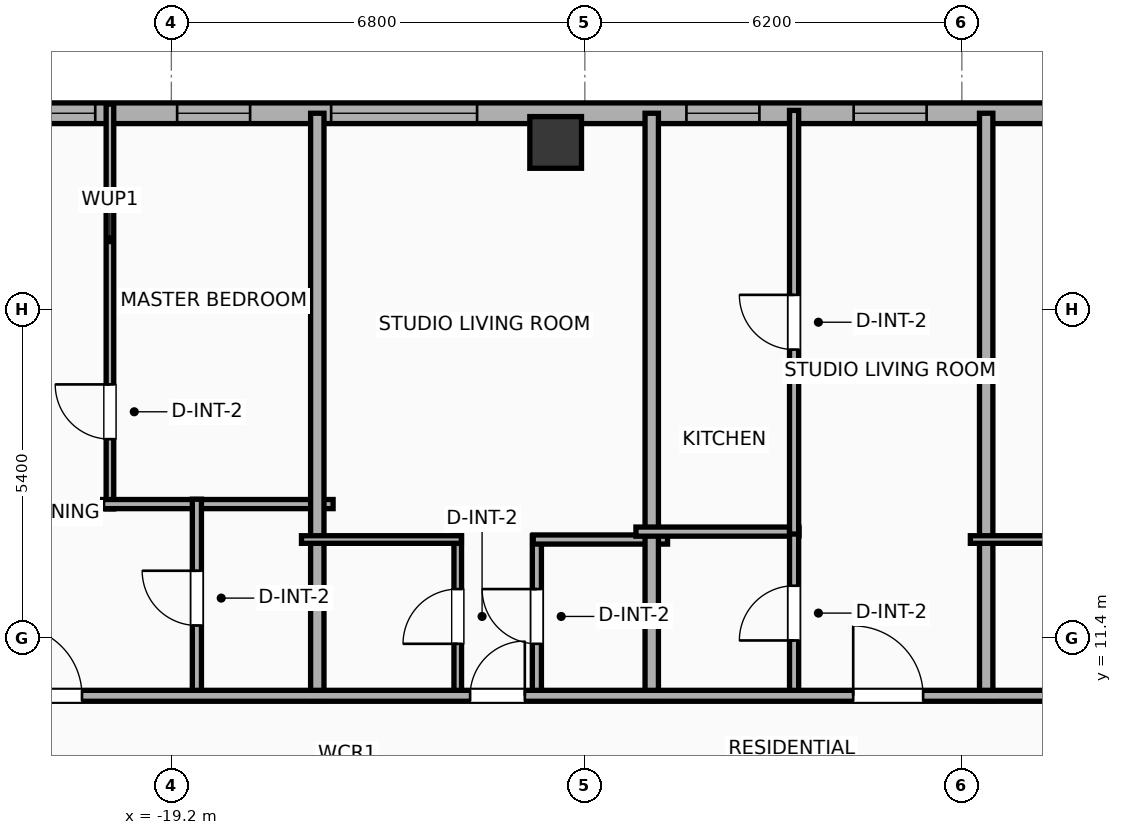
"""IFC4 building model, lengths in metres.
Left out: names, types, materials, properties, quantities, classifications, styles, units other than length and angle.
Written with IfcOpenShell. Run it as: python <this file> out.ifc"""

import sys

from ifc_helpers import new_model, si_unit, direction, frame, frame_2d, origin, origin_2d, place, context, subcontext, project, spatial, rectangle, hollow_rectangle, extrude, element, fill, save


model = new_model("IFC4")
c1 = context("Model", 3, precision=1e-05, world=origin(), true_north=direction((0.0, 1.0)))
c2 = subcontext(c1, "Body", "Model", "MODEL_VIEW")
j1 = project(units=[si_unit("LENGTHUNIT", "METRE"), si_unit("PLANEANGLEUNIT", "RADIAN")], contexts=[c1])
p1 = place(None, origin())
s1 = spatial("IfcSite", under=j1, at=p1, CompositionType="ELEMENT")
p2 = place(p1, origin())
s2 = spatial("IfcBuilding", under=s1, at=p2, CompositionType="ELEMENT")
p3 = place(p2, frame((0.0, 0.0, 239.2)))
s3 = spatial("IfcBuildingStorey", under=s2, at=p3, CompositionType="ELEMENT", Elevation=239.2)
p4 = place(p3, frame((-12.88, 19.55, 0.0), z_axis=(0.0, 0.0, 1.0), x_axis=(1.0, 0.0, 0.0)))
e1 = element("IfcColumn", 1, at=p4, inside=s3, PredefinedType="COLUMN", context=c2, shape_type="SweptSolid", body=[
    extrude(hollow_rectangle(XDim=0.85, YDim=0.85, WallThickness=0.028, at=origin_2d()), origin(), (0.0, 0.0, 1.0), 3.9),
])
p5 = place(p3, frame((-22.783, 20.03, 0.0), z_axis=(0.0, 0.0, 1.0), x_axis=(1.0, 0.0, 0.0)))
e2 = element("IfcWall", 2, at=p5, inside=s3, PredefinedType="ELEMENTEDWALL", context=c2, shape_type="SweptSolid", body=[
    extrude(rectangle(XDim=49.566, YDim=0.34, at=frame_2d((24.783, 0.0))), origin(), (0.0, 0.0, 1.0), 3.65),
])
p6 = place(p5, frame((6.211, 0.0, 0.75)))
e3 = element("IfcOpeningElement", 3, at=p6, cuts=e2, PredefinedType="OPENING", context=c2, shape_type="SweptSolid", body=[
    extrude(rectangle(XDim=2.4, YDim=2.1, at=frame_2d((1.2, 1.05))), frame((0.0, 0.18, 0.0), z_axis=(0.0, -1.0, 0.0), x_axis=(1.0, 0.0, 0.0)), (0.0, 0.0, 1.0), 0.36),
])
p7 = place(p5, frame((22.733, 0.0, 0.75)))
e4 = element("IfcOpeningElement", 4, at=p7, cuts=e2, PredefinedType="OPENING", context=c2, shape_type="SweptSolid", body=[
    extrude(rectangle(XDim=2.4, YDim=2.1, at=frame_2d((1.2, 1.05))), frame((0.0, 0.18, 0.0), z_axis=(0.0, -1.0, 0.0), x_axis=(1.0, 0.0, 0.0)), (0.0, 0.0, 1.0), 0.36),
])
p8 = place(p5, frame((1.132, 0.0, 0.75)))
e5 = element("IfcOpeningElement", 5, at=p8, cuts=e2, PredefinedType="OPENING", context=c2, shape_type="SweptSolid", body=[
    extrude(rectangle(XDim=1.2, YDim=2.05, at=frame_2d((0.6, 1.025))), frame((0.0, 0.18, 0.0), z_axis=(0.0, -1.0, 0.0), x_axis=(1.0, 0.0, 0.0)), (0.0, 0.0, 1.0), 0.36),
])
p9 = place(p5, frame((3.678, 0.0, 0.75)))
e6 = element("IfcOpeningElement", 6, at=p9, cuts=e2, PredefinedType="OPENING", context=c2, shape_type="SweptSolid", body=[
    extrude(rectangle(XDim=1.2, YDim=2.05, at=frame_2d((0.6, 1.025))), frame((0.0, 0.18, 0.0), z_axis=(0.0, -1.0, 0.0), x_axis=(1.0, 0.0, 0.0)), (0.0, 0.0, 1.0), 0.36),
])
p10 = place(p5, frame((14.804, 0.0, 0.75)))
e7 = element("IfcOpeningElement", 7, at=p10, cuts=e2, PredefinedType="OPENING", context=c2, shape_type="SweptSolid", body=[
    extrude(rectangle(XDim=1.2, YDim=2.05, at=frame_2d((0.6, 1.025))), frame((0.0, 0.18, 0.0), z_axis=(0.0, -1.0, 0.0), x_axis=(1.0, 0.0, 0.0)), (0.0, 0.0, 1.0), 0.36),
])
p11 = place(p5, frame((12.054, 0.0, 0.75)))
e8 = element("IfcOpeningElement", 8, at=p11, cuts=e2, PredefinedType="OPENING", context=c2, shape_type="SweptSolid", body=[
    extrude(rectangle(XDim=1.2, YDim=2.05, at=frame_2d((0.6, 1.025))), frame((0.0, 0.18, 0.0), z_axis=(0.0, -1.0, 0.0), x_axis=(1.0, 0.0, 0.0)), (0.0, 0.0, 1.0), 0.36),
])
p12 = place(p5, frame((17.933, 0.0, 0.75)))
e9 = element("IfcOpeningElement", 9, at=p12, cuts=e2, PredefinedType="OPENING", context=c2, shape_type="SweptSolid", body=[
    extrude(rectangle(XDim=1.2, YDim=2.05, at=frame_2d((0.6, 1.025))), frame((0.0, 0.18, 0.0), z_axis=(0.0, -1.0, 0.0), x_axis=(1.0, 0.0, 0.0)), (0.0, 0.0, 1.0), 0.36),
])
p13 = place(p5, frame((26.278, 0.0, 0.75)))
e10 = element("IfcOpeningElement", 10, at=p13, cuts=e2, PredefinedType="OPENING", context=c2, shape_type="SweptSolid", body=[
    extrude(rectangle(XDim=1.2, YDim=2.05, at=frame_2d((0.6, 1.025))), frame((0.0, 0.18, 0.0), z_axis=(0.0, -1.0, 0.0), x_axis=(1.0, 0.0, 0.0)), (0.0, 0.0, 1.0), 0.36),
])
p14 = place(p5, frame((32.677, 0.0, 0.75)))
e11 = element("IfcOpeningElement", 11, at=p14, cuts=e2, PredefinedType="OPENING", context=c2, shape_type="SweptSolid", body=[
    extrude(rectangle(XDim=1.2, YDim=2.05, at=frame_2d((0.6, 1.025))), frame((0.0, 0.18, 0.0), z_axis=(0.0, -1.0, 0.0), x_axis=(1.0, 0.0, 0.0)), (0.0, 0.0, 1.0), 0.36),
])
p15 = place(p5, frame((28.217, 0.0, 0.75)))
e12 = element("IfcOpeningElement", 12, at=p15, cuts=e2, PredefinedType="OPENING", context=c2, shape_type="SweptSolid", body=[
    extrude(rectangle(XDim=0.85, YDim=2.05, at=frame_2d((0.425, 1.025))), frame((0.0, 0.18, 0.0), z_axis=(0.0, -1.0, 0.0), x_axis=(1.0, 0.0, 0.0)), (0.0, 0.0, 1.0), 0.36),
])
p16 = place(p5, frame((36.678, 0.0, 0.75)))
e13 = element("IfcOpeningElement", 13, at=p16, cuts=e2, PredefinedType="OPENING", context=c2, shape_type="SweptSolid", body=[
    extrude(rectangle(XDim=1.2, YDim=2.05, at=frame_2d((0.6, 1.025))), frame((0.0, 0.18, 0.0), z_axis=(0.0, -1.0, 0.0), x_axis=(1.0, 0.0, 0.0)), (0.0, 0.0, 1.0), 0.36),
])
p17 = place(p5, frame((40.307, 0.0, 0.75)))
e14 = element("IfcOpeningElement", 14, at=p17, cuts=e2, PredefinedType="OPENING", context=c2, shape_type="SweptSolid", body=[
    extrude(rectangle(XDim=1.2, YDim=2.05, at=frame_2d((0.6, 1.025))), frame((0.0, 0.18, 0.0), z_axis=(0.0, -1.0, 0.0), x_axis=(1.0, 0.0, 0.0)), (0.0, 0.0, 1.0), 0.36),
])
p18 = place(p5, frame((43.696, 0.0, 0.75)))
e15 = element("IfcOpeningElement", 15, at=p18, cuts=e2, PredefinedType="OPENING", context=c2, shape_type="SweptSolid", body=[
    extrude(rectangle(XDim=1.2, YDim=2.05, at=frame_2d((0.6, 1.025))), frame((0.0, 0.18, 0.0), z_axis=(0.0, -1.0, 0.0), x_axis=(1.0, 0.0, 0.0)), (0.0, 0.0, 1.0), 0.36),
])
p19 = place(p5, frame((46.739, 0.0, 0.75)))
e16 = element("IfcOpeningElement", 16, at=p19, cuts=e2, PredefinedType="OPENING", context=c2, shape_type="SweptSolid", body=[
    extrude(rectangle(XDim=1.2, YDim=2.05, at=frame_2d((0.6, 1.025))), frame((0.0, 0.18, 0.0), z_axis=(0.0, -1.0, 0.0), x_axis=(1.0, 0.0, 0.0)), (0.0, 0.0, 1.0), 0.36),
])
p20 = place(p3, frame((-20.21, 13.523, 0.0), z_axis=(0.0, 0.0, 1.0), x_axis=(0.0, 1.0, 0.0)))
e17 = element("IfcWall", 17, at=p20, inside=s3, PredefinedType="PARTITIONING", context=c2, shape_type="SweptSolid", body=[
    extrude(rectangle(XDim=6.657, YDim=0.125, at=frame_2d((3.329, 0.0))), origin(), (0.0, 0.0, 1.0), 3.65),
])
p21 = place(p20, frame((1.148, 0.0, 0.0)))
e18 = element("IfcOpeningElement", 18, at=p21, cuts=e17, PredefinedType="OPENING", context=c2, shape_type="SweptSolid", body=[
    extrude(rectangle(XDim=0.9, YDim=2.05, at=frame_2d((0.45, 1.025))), frame((0.0, 0.073, 0.0), z_axis=(0.0, -1.0, 0.0), x_axis=(1.0, 0.0, 0.0)), (0.0, 0.0, 1.0), 0.145),
])
p22 = place(p3, frame((-20.33, 13.603, 0.0), z_axis=(0.0, 0.0, 1.0), x_axis=(1.0, 0.0, 0.0)))
e19 = element("IfcWall", 19, at=p22, inside=s3, PredefinedType="PLUMBINGWALL", context=c2, shape_type="SweptSolid", body=[
    extrude(rectangle(XDim=3.79, YDim=0.15, at=frame_2d((1.895, 0.0))), origin(), (0.0, 0.0, 1.0), 3.65),
])
p23 = place(p3, frame((-18.78, 10.43, 0.0), z_axis=(0.0, 0.0, 1.0), x_axis=(0.0, 1.0, 0.0)))
e20 = element("IfcWall", 20, at=p23, inside=s3, PredefinedType="PLUMBINGWALL", context=c2, shape_type="SweptSolid", body=[
    extrude(rectangle(XDim=3.253, YDim=0.15, at=frame_2d((1.626, 0.0))), origin(), (0.0, 0.0, 1.0), 3.65),
])
p24 = place(p23, frame((1.177, 0.0, 0.0)))
e21 = element("IfcOpeningElement", 21, at=p24, cuts=e20, PredefinedType="OPENING", context=c2, shape_type="SweptSolid", body=[
    extrude(rectangle(XDim=0.9, YDim=2.05, at=frame_2d((0.45, 1.025))), frame((0.0, 0.085, 0.0), z_axis=(0.0, -1.0, 0.0), x_axis=(1.0, 0.0, 0.0)), (0.0, 0.0, 1.0), 0.17),
])
p25 = place(p3, frame((-16.8, 10.37, 0.0), z_axis=(0.0, 0.0, 1.0), x_axis=(0.0, 1.0, 0.0)))
e22 = element("IfcWall", 22, at=p25, inside=s3, PredefinedType="PARTITIONING", context=c2, shape_type="SweptSolid", body=[
    extrude(rectangle(XDim=9.66, YDim=0.22, at=frame_2d((4.83, 0.0))), origin(), (0.0, 0.0, 1.0), 3.65),
])
p26 = place(p3, frame((-14.49, 10.43, 0.0), z_axis=(0.0, 0.0, 1.0), x_axis=(0.0, 1.0, 0.0)))
e23 = element("IfcWall", 23, at=p26, inside=s3, PredefinedType="PARTITIONING", context=c2, shape_type="SweptSolid", body=[
    extrude(rectangle(XDim=2.65, YDim=0.125, at=frame_2d((1.325, 0.0))), origin(), (0.0, 0.0, 1.0), 3.65),
])
p27 = place(p26, frame((0.875, 0.0, 0.0)))
e24 = element("IfcOpeningElement", 24, at=p27, cuts=e23, PredefinedType="OPENING", context=c2, shape_type="SweptSolid", body=[
    extrude(rectangle(XDim=0.9, YDim=2.05, at=frame_2d((0.45, 1.025))), frame((0.0, 0.073, 0.0), z_axis=(0.0, -1.0, 0.0), x_axis=(1.0, 0.0, 0.0)), (0.0, 0.0, 1.0), 0.145),
])
p28 = place(p3, frame((-13.189, 10.43, 0.0), z_axis=(0.0, 0.0, 1.0), x_axis=(0.0, 1.0, 0.0)))
e25 = element("IfcWall", 25, at=p28, inside=s3, PredefinedType="PLUMBINGWALL", context=c2, shape_type="SweptSolid", body=[
    extrude(rectangle(XDim=2.65, YDim=0.15, at=frame_2d((1.325, 0.0))), origin(), (0.0, 0.0, 1.0), 3.65),
])
p29 = place(p28, frame((0.875, 0.0, 0.0)))
e26 = element("IfcOpeningElement", 26, at=p29, cuts=e25, PredefinedType="OPENING", context=c2, shape_type="SweptSolid", body=[
    extrude(rectangle(XDim=0.9, YDim=2.05, at=frame_2d((0.45, 1.025))), frame((0.0, 0.085, 0.0), z_axis=(0.0, -1.0, 0.0), x_axis=(1.0, 0.0, 0.0)), (0.0, 0.0, 1.0), 0.17),
])
p30 = place(p3, frame((-17.06, 13.02, 0.0), z_axis=(0.0, 0.0, 1.0), x_axis=(1.0, 0.0, 0.0)))
e27 = element("IfcWall", 27, at=p30, inside=s3, PredefinedType="PARTITIONING", context=c2, shape_type="SweptSolid", body=[
    extrude(rectangle(XDim=2.63, YDim=0.125, at=frame_2d((1.315, 0.0))), origin(), (0.0, 0.0, 1.0), 3.65),
])
p31 = place(p3, frame((-13.249, 13.02, 0.0), z_axis=(0.0, 0.0, 1.0), x_axis=(1.0, 0.0, 0.0)))
e28 = element("IfcWall", 28, at=p31, inside=s3, PredefinedType="PLUMBINGWALL", context=c2, shape_type="SweptSolid", body=[
    extrude(rectangle(XDim=2.209, YDim=0.15, at=frame_2d((1.104, 0.0))), origin(), (0.0, 0.0, 1.0), 3.65),
])
p32 = place(p3, frame((-11.3, 10.37, 0.0), z_axis=(0.0, 0.0, 1.0), x_axis=(0.0, 1.0, 0.0)))
e29 = element("IfcWall", 29, at=p32, inside=s3, PredefinedType="PARTITIONING", context=c2, shape_type="SweptSolid", body=[
    extrude(rectangle(XDim=9.66, YDim=0.22, at=frame_2d((4.83, 0.0))), origin(), (0.0, 0.0, 1.0), 3.65),
])
p33 = place(p3, frame((-11.56, 13.15, 0.0), z_axis=(0.0, 0.0, 1.0), x_axis=(1.0, 0.0, 0.0)))
e30 = element("IfcWall", 30, at=p33, inside=s3, PredefinedType="PLUMBINGWALL", context=c2, shape_type="SweptSolid", body=[
    extrude(rectangle(XDim=2.681, YDim=0.15, at=frame_2d((1.341, 0.0))), origin(), (0.0, 0.0, 1.0), 3.65),
])
p34 = place(p3, frame((-8.959, 10.43, 0.0), z_axis=(0.0, 0.0, 1.0), x_axis=(0.0, 1.0, 0.0)))
e31 = element("IfcWall", 31, at=p34, inside=s3, PredefinedType="PLUMBINGWALL", context=c2, shape_type="SweptSolid", body=[
    extrude(rectangle(XDim=2.76, YDim=0.15, at=frame_2d((1.38, 0.0))), origin(), (0.0, 0.0, 1.0), 3.65),
])
p35 = place(p34, frame((0.93, 0.0, 0.0)))
e32 = element("IfcOpeningElement", 32, at=p35, cuts=e31, PredefinedType="OPENING", context=c2, shape_type="SweptSolid", body=[
    extrude(rectangle(XDim=0.9, YDim=2.05, at=frame_2d((0.45, 1.025))), frame((0.0, 0.085, 0.0), z_axis=(0.0, -1.0, 0.0), x_axis=(1.0, 0.0, 0.0)), (0.0, 0.0, 1.0), 0.17),
])
p36 = place(p3, frame((-8.959, 13.11, 0.0), z_axis=(0.0, 0.0, 1.0), x_axis=(0.0, 1.0, 0.0)))
e33 = element("IfcWall", 33, at=p36, inside=s3, PredefinedType="PLUMBINGWALL", context=c2, shape_type="SweptSolid", body=[
    extrude(rectangle(XDim=6.967, YDim=0.15, at=frame_2d((3.483, 0.0))), origin(), (0.0, 0.0, 1.0), 3.65),
])
p37 = place(p36, frame((3.033, 0.0, 0.0)))
e34 = element("IfcOpeningElement", 34, at=p37, cuts=e33, PredefinedType="OPENING", context=c2, shape_type="SweptSolid", body=[
    extrude(rectangle(XDim=0.9, YDim=2.05, at=frame_2d((0.45, 1.025))), frame((0.0, 0.085, 0.0), z_axis=(0.0, -1.0, 0.0), x_axis=(1.0, 0.0, 0.0)), (0.0, 0.0, 1.0), 0.17),
])
p38 = place(p3, frame((-5.8, 10.37, 0.0), z_axis=(0.0, 0.0, 1.0), x_axis=(0.0, 1.0, 0.0)))
e35 = element("IfcWall", 35, at=p38, inside=s3, PredefinedType="PARTITIONING", context=c2, shape_type="SweptSolid", body=[
    extrude(rectangle(XDim=9.66, YDim=0.22, at=frame_2d((4.83, 0.0))), origin(), (0.0, 0.0, 1.0), 3.65),
])
p39 = place(p3, frame((-6.06, 13.02, 0.0), z_axis=(0.0, 0.0, 1.0), x_axis=(1.0, 0.0, 0.0)))
e36 = element("IfcWall", 36, at=p39, inside=s3, PredefinedType="PARTITIONING", context=c2, shape_type="SweptSolid", body=[
    extrude(rectangle(XDim=2.63, YDim=0.125, at=frame_2d((1.315, 0.0))), origin(), (0.0, 0.0, 1.0), 3.65),
])
p40 = place(p3, frame((-26.23, 10.45, 0.0), z_axis=(0.0, 0.0, 1.0), x_axis=(1.0, 0.0, 0.0)))
e37 = element("IfcWall", 37, at=p40, inside=s3, PredefinedType="PARTITIONING", context=c2, shape_type="SweptSolid", body=[
    extrude(rectangle(XDim=56.46, YDim=0.18, at=frame_2d((28.23, 0.0))), origin(), (0.0, 0.0, 1.0), 3.65),
])
p41 = place(p40, frame((4.41, 0.0, 0.0)))
e38 = element("IfcOpeningElement", 38, at=p41, cuts=e37, PredefinedType="OPENING", context=c2, shape_type="SweptSolid", body=[
    extrude(rectangle(XDim=1.15, YDim=2.05, at=frame_2d((0.575, 1.025))), frame((0.0, 0.1, 0.0), z_axis=(0.0, -1.0, 0.0), x_axis=(1.0, 0.0, 0.0)), (0.0, 0.0, 1.0), 0.2),
])
p42 = place(p40, frame((11.943, 0.0, 0.0)))
e39 = element("IfcOpeningElement", 39, at=p42, cuts=e37, PredefinedType="OPENING", context=c2, shape_type="SweptSolid", body=[
    extrude(rectangle(XDim=0.9, YDim=2.05, at=frame_2d((0.45, 1.025))), frame((0.0, 0.1, 0.0), z_axis=(0.0, -1.0, 0.0), x_axis=(1.0, 0.0, 0.0)), (0.0, 0.0, 1.0), 0.2),
])
p43 = place(p40, frame((18.243, 0.0, 0.0)))
e40 = element("IfcOpeningElement", 40, at=p43, cuts=e37, PredefinedType="OPENING", context=c2, shape_type="SweptSolid", body=[
    extrude(rectangle(XDim=1.15, YDim=2.05, at=frame_2d((0.575, 1.025))), frame((0.0, 0.1, 0.0), z_axis=(0.0, -1.0, 0.0), x_axis=(1.0, 0.0, 0.0)), (0.0, 0.0, 1.0), 0.2),
])
p44 = place(p40, frame((22.941, 0.0, 0.0)))
e41 = element("IfcOpeningElement", 41, at=p44, cuts=e37, PredefinedType="OPENING", context=c2, shape_type="SweptSolid", body=[
    extrude(rectangle(XDim=0.9, YDim=2.05, at=frame_2d((0.45, 1.025))), frame((0.0, 0.1, 0.0), z_axis=(0.0, -1.0, 0.0), x_axis=(1.0, 0.0, 0.0)), (0.0, 0.0, 1.0), 0.2),
])
p45 = place(p40, frame((27.028, 0.0, 0.0)))
e42 = element("IfcOpeningElement", 42, at=p45, cuts=e37, PredefinedType="OPENING", context=c2, shape_type="SweptSolid", body=[
    extrude(rectangle(XDim=1.15, YDim=2.05, at=frame_2d((0.575, 1.025))), frame((0.0, 0.1, 0.0), z_axis=(0.0, -1.0, 0.0), x_axis=(1.0, 0.0, 0.0)), (0.0, 0.0, 1.0), 0.2),
])
p46 = place(p40, frame((36.864, 0.0, 0.0)))
e43 = element("IfcOpeningElement", 43, at=p46, cuts=e37, PredefinedType="OPENING", context=c2, shape_type="SweptSolid", body=[
    extrude(rectangle(XDim=1.15, YDim=2.05, at=frame_2d((0.575, 1.025))), frame((0.0, 0.1, 0.0), z_axis=(0.0, -1.0, 0.0), x_axis=(1.0, 0.0, 0.0)), (0.0, 0.0, 1.0), 0.2),
])
p47 = place(p40, frame((45.655, 0.0, 0.0)))
e44 = element("IfcOpeningElement", 44, at=p47, cuts=e37, PredefinedType="OPENING", context=c2, shape_type="SweptSolid", body=[
    extrude(rectangle(XDim=0.9, YDim=2.05, at=frame_2d((0.45, 1.025))), frame((0.0, 0.1, 0.0), z_axis=(0.0, -1.0, 0.0), x_axis=(1.0, 0.0, 0.0)), (0.0, 0.0, 1.0), 0.2),
])
p48 = place(p40, frame((52.576, 0.0, 0.0)))
e45 = element("IfcOpeningElement", 45, at=p48, cuts=e37, PredefinedType="OPENING", context=c2, shape_type="SweptSolid", body=[
    extrude(rectangle(XDim=1.15, YDim=2.05, at=frame_2d((0.575, 1.025))), frame((0.0, 0.1, 0.0), z_axis=(0.0, -1.0, 0.0), x_axis=(1.0, 0.0, 0.0)), (0.0, 0.0, 1.0), 0.2),
])
p49 = place(p6, origin())
e46 = element("IfcWindow", 46, at=p49, inside=s3, PartitioningType="SINGLE_PANEL", PredefinedType="WINDOW", context=c2, shape_type="SweptSolid", body=[
    extrude(rectangle(XDim=2.4, YDim=2.1, at=frame_2d((1.2, 1.05))), frame((0.0, 0.03, 0.0), z_axis=(0.0, -1.0, 0.0), x_axis=(1.0, 0.0, 0.0)), (0.0, 0.0, 1.0), 0.06),
])
fill(e3, e46)
p50 = place(p8, origin())
e47 = element("IfcWindow", 47, at=p50, inside=s3, PartitioningType="SINGLE_PANEL", PredefinedType="WINDOW", context=c2, shape_type="SweptSolid", body=[
    extrude(rectangle(XDim=1.2, YDim=2.05, at=frame_2d((0.6, 1.025))), frame((0.0, 0.03, 0.0), z_axis=(0.0, -1.0, 0.0), x_axis=(1.0, 0.0, 0.0)), (0.0, 0.0, 1.0), 0.06),
])
fill(e5, e47)
p51 = place(p9, origin())
e48 = element("IfcWindow", 48, at=p51, inside=s3, PartitioningType="SINGLE_PANEL", PredefinedType="WINDOW", context=c2, shape_type="SweptSolid", body=[
    extrude(rectangle(XDim=1.2, YDim=2.05, at=frame_2d((0.6, 1.025))), frame((0.0, 0.03, 0.0), z_axis=(0.0, -1.0, 0.0), x_axis=(1.0, 0.0, 0.0)), (0.0, 0.0, 1.0), 0.06),
])
fill(e6, e48)
p52 = place(p10, origin())
e49 = element("IfcWindow", 49, at=p52, inside=s3, PartitioningType="SINGLE_PANEL", PredefinedType="WINDOW", context=c2, shape_type="SweptSolid", body=[
    extrude(rectangle(XDim=1.2, YDim=2.05, at=frame_2d((0.6, 1.025))), frame((0.0, 0.03, 0.0), z_axis=(0.0, -1.0, 0.0), x_axis=(1.0, 0.0, 0.0)), (0.0, 0.0, 1.0), 0.06),
])
fill(e7, e49)
p53 = place(p11, origin())
e50 = element("IfcWindow", 50, at=p53, inside=s3, PartitioningType="SINGLE_PANEL", PredefinedType="WINDOW", context=c2, shape_type="SweptSolid", body=[
    extrude(rectangle(XDim=1.2, YDim=2.05, at=frame_2d((0.6, 1.025))), frame((0.0, 0.03, 0.0), z_axis=(0.0, -1.0, 0.0), x_axis=(1.0, 0.0, 0.0)), (0.0, 0.0, 1.0), 0.06),
])
fill(e8, e50)
p54 = place(p21, origin())
e51 = element("IfcDoor", 51, at=p54, inside=s3, OperationType="SINGLE_SWING_RIGHT", PredefinedType="DOOR", context=c2, shape_type="SweptSolid", body=[
    extrude(rectangle(XDim=0.9, YDim=2.05, at=frame_2d((0.45, 1.025))), frame((0.0, 0.025, 0.0), z_axis=(0.0, -1.0, 0.0), x_axis=(1.0, 0.0, 0.0)), (0.0, 0.0, 1.0), 0.05),
])
fill(e18, e51)
p55 = place(p24, origin())
e52 = element("IfcDoor", 52, at=p55, inside=s3, OperationType="SINGLE_SWING_RIGHT", PredefinedType="DOOR", context=c2, shape_type="SweptSolid", body=[
    extrude(rectangle(XDim=0.9, YDim=2.05, at=frame_2d((0.45, 1.025))), frame((0.0, 0.025, 0.0), z_axis=(0.0, -1.0, 0.0), x_axis=(1.0, 0.0, 0.0)), (0.0, 0.0, 1.0), 0.05),
])
fill(e21, e52)
p56 = place(p27, origin())
e53 = element("IfcDoor", 53, at=p56, inside=s3, OperationType="SINGLE_SWING_LEFT", PredefinedType="DOOR", context=c2, shape_type="SweptSolid", body=[
    extrude(rectangle(XDim=0.9, YDim=2.05, at=frame_2d((0.45, 1.025))), frame((0.0, 0.025, 0.0), z_axis=(0.0, -1.0, 0.0), x_axis=(1.0, 0.0, 0.0)), (0.0, 0.0, 1.0), 0.05),
])
fill(e24, e53)
p57 = place(p29, origin())
e54 = element("IfcDoor", 54, at=p57, inside=s3, OperationType="SINGLE_SWING_RIGHT", PredefinedType="DOOR", context=c2, shape_type="SweptSolid", body=[
    extrude(rectangle(XDim=0.9, YDim=2.05, at=frame_2d((0.45, 1.025))), frame((0.0, 0.025, 0.0), z_axis=(0.0, -1.0, 0.0), x_axis=(1.0, 0.0, 0.0)), (0.0, 0.0, 1.0), 0.05),
])
fill(e26, e54)
p58 = place(p35, origin())
e55 = element("IfcDoor", 55, at=p58, inside=s3, OperationType="SINGLE_SWING_LEFT", PredefinedType="DOOR", context=c2, shape_type="SweptSolid", body=[
    extrude(rectangle(XDim=0.9, YDim=2.05, at=frame_2d((0.45, 1.025))), frame((0.0, 0.025, 0.0), z_axis=(0.0, -1.0, 0.0), x_axis=(1.0, 0.0, 0.0)), (0.0, 0.0, 1.0), 0.05),
])
fill(e32, e55)
p59 = place(p37, origin())
e56 = element("IfcDoor", 56, at=p59, inside=s3, OperationType="SINGLE_SWING_RIGHT", PredefinedType="DOOR", context=c2, shape_type="SweptSolid", body=[
    extrude(rectangle(XDim=0.9, YDim=2.05, at=frame_2d((0.45, 1.025))), frame((0.0, 0.025, 0.0), z_axis=(0.0, -1.0, 0.0), x_axis=(1.0, 0.0, 0.0)), (0.0, 0.0, 1.0), 0.05),
])
fill(e34, e56)
p60 = place(p41, origin())
e57 = element("IfcDoor", 57, at=p60, inside=s3, OperationType="SINGLE_SWING_LEFT", PredefinedType="DOOR", context=c2, shape_type="SweptSolid", body=[
    extrude(rectangle(XDim=1.15, YDim=2.05, at=frame_2d((0.575, 1.025))), frame((0.0, 0.025, 0.0), z_axis=(0.0, -1.0, 0.0), x_axis=(1.0, 0.0, 0.0)), (0.0, 0.0, 1.0), 0.05),
])
fill(e38, e57)
p61 = place(p42, origin())
e58 = element("IfcDoor", 58, at=p61, inside=s3, OperationType="SINGLE_SWING_RIGHT", PredefinedType="DOOR", context=c2, shape_type="SweptSolid", body=[
    extrude(rectangle(XDim=0.9, YDim=2.05, at=frame_2d((0.45, 1.025))), frame((0.0, 0.025, 0.0), z_axis=(0.0, -1.0, 0.0), x_axis=(1.0, 0.0, 0.0)), (0.0, 0.0, 1.0), 0.05),
])
fill(e39, e58)
p62 = place(p43, origin())
e59 = element("IfcDoor", 59, at=p62, inside=s3, OperationType="SINGLE_SWING_LEFT", PredefinedType="DOOR", context=c2, shape_type="SweptSolid", body=[
    extrude(rectangle(XDim=1.15, YDim=2.05, at=frame_2d((0.575, 1.025))), frame((0.0, 0.025, 0.0), z_axis=(0.0, -1.0, 0.0), x_axis=(1.0, 0.0, 0.0)), (0.0, 0.0, 1.0), 0.05),
])
fill(e40, e59)
save(model, sys.argv[1])
